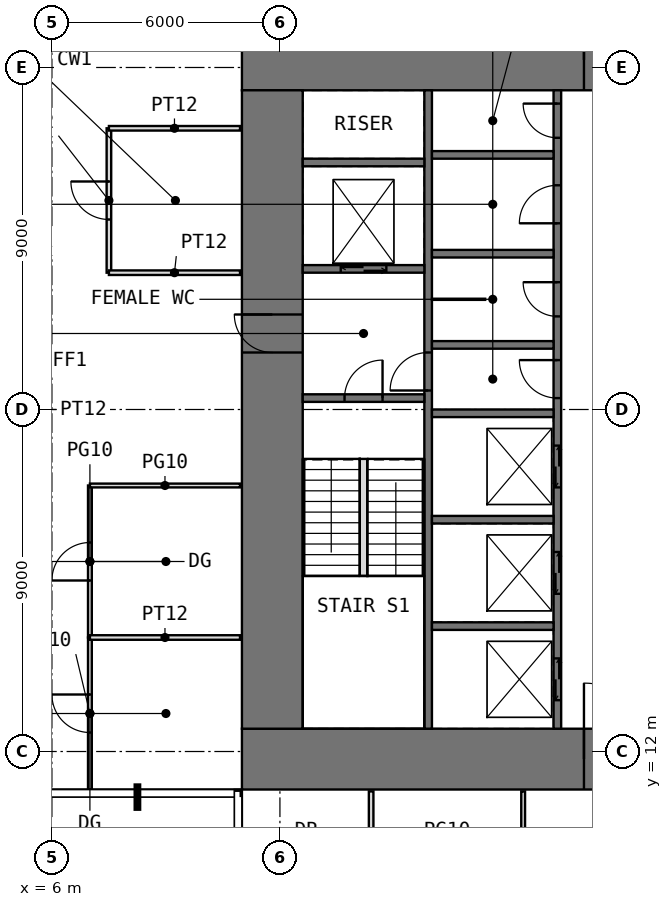
"""IFC4 building model, lengths in metres.
Left out: names, types, materials, properties, quantities, classifications, styles, units other than length and angle.
Written with IfcOpenShell. Run it as: python <this file> out.ifc"""

import sys

from ifc_helpers import new_model, si_unit, direction, frame, frame_2d, origin, place, context, subcontext, project, spatial, rectangle, extrude, element, fill, save


model = new_model("IFC4")
c1 = context("Model", 3, precision=1e-05, world=origin(), true_north=direction((0.0, 1.0)))
c2 = subcontext(c1, "Body", "Model", "MODEL_VIEW")
j1 = project(units=[si_unit("LENGTHUNIT", "METRE"), si_unit("PLANEANGLEUNIT", "RADIAN")], contexts=[c1])
p1 = place(None, origin())
s1 = spatial("IfcSite", under=j1, at=p1, CompositionType="ELEMENT")
p2 = place(p1, origin())
s2 = spatial("IfcBuilding", under=s1, at=p2, CompositionType="ELEMENT")
p3 = place(p2, frame((0.0, 0.0, 108.5)))
s3 = spatial("IfcBuildingStorey", under=s2, at=p3, CompositionType="ELEMENT", Elevation=108.5)
p4 = place(p3, frame((11.0, 11.8, -0.05), z_axis=(0.0, 0.0, 1.0), x_axis=(1.0, 0.0, 0.0)))
e1 = element("IfcWall", 1, at=p4, inside=s3, PredefinedType="SHEAR", context=c2, shape_type="SweptSolid", body=[
    extrude(rectangle(XDim=20.0, YDim=1.6, at=frame_2d((10.0, 0.0))), origin(), (0.0, 0.0, 1.0), 4.0),
])
p5 = place(p4, frame((9.0, 0.0, 0.05)))
e2 = element("IfcOpeningElement", 2, at=p5, cuts=e1, PredefinedType="OPENING", context=c2, shape_type="SweptSolid", body=[
    extrude(rectangle(XDim=2.0, YDim=2.2, at=frame_2d((1.0, 1.1))), frame((0.0, 0.81, 0.0), z_axis=(0.0, -1.0, 0.0), x_axis=(1.0, 0.0, 0.0)), (0.0, 0.0, 1.0), 1.62),
])
p6 = place(p3, frame((11.0, 30.2, -0.05), z_axis=(0.0, 0.0, 1.0), x_axis=(1.0, 0.0, 0.0)))
e3 = element("IfcWall", 3, at=p6, inside=s3, PredefinedType="SHEAR", context=c2, shape_type="SweptSolid", body=[
    extrude(rectangle(XDim=20.0, YDim=1.6, at=frame_2d((10.0, 0.0))), origin(), (0.0, 0.0, 1.0), 4.0),
])
p7 = place(p6, frame((9.0, 0.0, 0.05)))
e4 = element("IfcOpeningElement", 4, at=p7, cuts=e3, PredefinedType="OPENING", context=c2, shape_type="SweptSolid", body=[
    extrude(rectangle(XDim=2.0, YDim=2.2, at=frame_2d((1.0, 1.1))), frame((0.0, 0.81, 0.0), z_axis=(0.0, -1.0, 0.0), x_axis=(1.0, 0.0, 0.0)), (0.0, 0.0, 1.0), 1.62),
])
p8 = place(p3, frame((11.8, 12.6, -0.05), z_axis=(0.0, 0.0, 1.0), x_axis=(0.0, 1.0, 0.0)))
e5 = element("IfcWall", 5, at=p8, inside=s3, PredefinedType="SHEAR", context=c2, shape_type="SweptSolid", body=[
    extrude(rectangle(XDim=16.8, YDim=1.6, at=frame_2d((8.4, 0.0))), origin(), (0.0, 0.0, 1.0), 4.0),
])
p9 = place(p8, frame((9.9, 0.0, 0.05)))
e6 = element("IfcOpeningElement", 6, at=p9, cuts=e5, PredefinedType="OPENING", context=c2, shape_type="SweptSolid", body=[
    extrude(rectangle(XDim=1.0, YDim=2.2, at=frame_2d((0.5, 1.1))), frame((0.0, 0.81, 0.0), z_axis=(0.0, -1.0, 0.0), x_axis=(1.0, 0.0, 0.0)), (0.0, 0.0, 1.0), 1.62),
])
p10 = place(p3, frame((15.9, 12.6, -0.05), z_axis=(0.0, 0.0, 1.0), x_axis=(0.0, 1.0, 0.0)))
e7 = element("IfcWall", 7, at=p10, inside=s3, PredefinedType="SHEAR", context=c2, shape_type="SweptSolid", body=[
    extrude(rectangle(XDim=16.8, YDim=0.2, at=frame_2d((8.4, 0.0))), origin(), (0.0, 0.0, 1.0), 4.0),
])
p11 = place(p10, frame((8.9, 0.0, 0.05)))
e8 = element("IfcOpeningElement", 8, at=p11, cuts=e7, PredefinedType="OPENING", context=c2, shape_type="SweptSolid", body=[
    extrude(rectangle(XDim=1.0, YDim=2.2, at=frame_2d((0.5, 1.1))), frame((0.0, 0.11, 0.0), z_axis=(0.0, -1.0, 0.0), x_axis=(1.0, 0.0, 0.0)), (0.0, 0.0, 1.0), 0.22),
])
p12 = place(p3, frame((19.3, 12.6, -0.05), z_axis=(0.0, 0.0, 1.0), x_axis=(0.0, 1.0, 0.0)))
e9 = element("IfcWall", 9, at=p12, inside=s3, PredefinedType="SHEAR", context=c2, shape_type="SweptSolid", body=[
    extrude(rectangle(XDim=16.8, YDim=0.2, at=frame_2d((8.4, 0.0))), origin(), (0.0, 0.0, 1.0), 4.0),
])
p13 = place(p12, frame((8.7, 0.0, 0.05)))
e10 = element("IfcOpeningElement", 10, at=p13, cuts=e9, PredefinedType="OPENING", context=c2, shape_type="SweptSolid", body=[
    extrude(rectangle(XDim=1.0, YDim=2.2, at=frame_2d((0.5, 1.1))), frame((0.0, 0.11, 0.0), z_axis=(0.0, -1.0, 0.0), x_axis=(1.0, 0.0, 0.0)), (0.0, 0.0, 1.0), 0.22),
])
p14 = place(p12, frame((10.85, 0.0, 0.05)))
e11 = element("IfcOpeningElement", 11, at=p14, cuts=e9, PredefinedType="OPENING", context=c2, shape_type="SweptSolid", body=[
    extrude(rectangle(XDim=0.9, YDim=2.2, at=frame_2d((0.45, 1.1))), frame((0.0, 0.11, 0.0), z_axis=(0.0, -1.0, 0.0), x_axis=(1.0, 0.0, 0.0)), (0.0, 0.0, 1.0), 0.22),
])
p15 = place(p12, frame((13.3, 0.0, 0.05)))
e12 = element("IfcOpeningElement", 12, at=p15, cuts=e9, PredefinedType="OPENING", context=c2, shape_type="SweptSolid", body=[
    extrude(rectangle(XDim=1.0, YDim=2.2, at=frame_2d((0.5, 1.1))), frame((0.0, 0.11, 0.0), z_axis=(0.0, -1.0, 0.0), x_axis=(1.0, 0.0, 0.0)), (0.0, 0.0, 1.0), 0.22),
])
p16 = place(p12, frame((15.55, 0.0, 0.05)))
e13 = element("IfcOpeningElement", 13, at=p16, cuts=e9, PredefinedType="OPENING", context=c2, shape_type="SweptSolid", body=[
    extrude(rectangle(XDim=0.9, YDim=2.2, at=frame_2d((0.45, 1.1))), frame((0.0, 0.11, 0.0), z_axis=(0.0, -1.0, 0.0), x_axis=(1.0, 0.0, 0.0)), (0.0, 0.0, 1.0), 0.22),
])
p17 = place(p12, frame((0.75, 0.0, 0.05)))
e14 = element("IfcOpeningElement", 14, at=p17, cuts=e9, PredefinedType="OPENING", context=c2, shape_type="SweptSolid", body=[
    extrude(rectangle(XDim=1.1, YDim=2.2, at=frame_2d((0.55, 1.1))), frame((0.0, 0.11, 0.0), z_axis=(0.0, -1.0, 0.0), x_axis=(1.0, 0.0, 0.0)), (0.0, 0.0, 1.0), 0.22),
])
p18 = place(p12, frame((3.55, 0.0, 0.05)))
e15 = element("IfcOpeningElement", 15, at=p18, cuts=e9, PredefinedType="OPENING", context=c2, shape_type="SweptSolid", body=[
    extrude(rectangle(XDim=1.1, YDim=2.2, at=frame_2d((0.55, 1.1))), frame((0.0, 0.11, 0.0), z_axis=(0.0, -1.0, 0.0), x_axis=(1.0, 0.0, 0.0)), (0.0, 0.0, 1.0), 0.22),
])
p19 = place(p12, frame((6.35, 0.0, 0.05)))
e16 = element("IfcOpeningElement", 16, at=p19, cuts=e9, PredefinedType="OPENING", context=c2, shape_type="SweptSolid", body=[
    extrude(rectangle(XDim=1.1, YDim=2.2, at=frame_2d((0.55, 1.1))), frame((0.0, 0.11, 0.0), z_axis=(0.0, -1.0, 0.0), x_axis=(1.0, 0.0, 0.0)), (0.0, 0.0, 1.0), 0.22),
])
p20 = place(p3, frame((12.6, 21.3, -0.05), z_axis=(0.0, 0.0, 1.0), x_axis=(1.0, 0.0, 0.0)))
e17 = element("IfcWall", 17, at=p20, inside=s3, PredefinedType="SHEAR", context=c2, shape_type="SweptSolid", body=[
    extrude(rectangle(XDim=3.2, YDim=0.2, at=frame_2d((1.6, 0.0))), origin(), (0.0, 0.0, 1.0), 4.0),
])
p21 = place(p20, frame((1.1, 0.0, 0.05)))
e18 = element("IfcOpeningElement", 18, at=p21, cuts=e17, PredefinedType="OPENING", context=c2, shape_type="SweptSolid", body=[
    extrude(rectangle(XDim=1.0, YDim=2.2, at=frame_2d((0.5, 1.1))), frame((0.0, 0.11, 0.0), z_axis=(0.0, -1.0, 0.0), x_axis=(1.0, 0.0, 0.0)), (0.0, 0.0, 1.0), 0.22),
])
p22 = place(p3, frame((12.6, 24.7, -0.05), z_axis=(0.0, 0.0, 1.0), x_axis=(1.0, 0.0, 0.0)))
e19 = element("IfcWall", 19, at=p22, inside=s3, PredefinedType="SHEAR", context=c2, shape_type="SweptSolid", body=[
    extrude(rectangle(XDim=3.2, YDim=0.2, at=frame_2d((1.6, 0.0))), origin(), (0.0, 0.0, 1.0), 4.0),
])
p23 = place(p22, frame((1.0, 0.0, 0.05)))
e20 = element("IfcOpeningElement", 20, at=p23, cuts=e19, PredefinedType="OPENING", context=c2, shape_type="SweptSolid", body=[
    extrude(rectangle(XDim=1.2, YDim=2.2, at=frame_2d((0.6, 1.1))), frame((0.0, 0.11, 0.0), z_axis=(0.0, -1.0, 0.0), x_axis=(1.0, 0.0, 0.0)), (0.0, 0.0, 1.0), 0.22),
])
for number, where, z_axis, x_axis in (
    (21, (12.6, 27.5, -0.05), (0.0, 0.0, 1.0), (1.0, 0.0, 0.0)),
    (22, (16.0, 15.3, -0.05), (0.0, 0.0, 1.0), (1.0, 0.0, 0.0)),
    (23, (16.0, 18.1, -0.05), (0.0, 0.0, 1.0), (1.0, 0.0, 0.0)),
    (24, (16.0, 20.9, -0.05), (0.0, 0.0, 1.0), (1.0, 0.0, 0.0)),
    (25, (16.0, 22.7, -0.05), (0.0, 0.0, 1.0), (1.0, 0.0, 0.0)),
    (26, (16.0, 25.1, -0.05), (0.0, 0.0, 1.0), (1.0, 0.0, 0.0)),
    (27, (16.0, 27.7, -0.05), (0.0, 0.0, 1.0), (1.0, 0.0, 0.0)),
):
    element("IfcWall", number, at=place(p3, frame(where, z_axis=z_axis, x_axis=x_axis)), inside=s3, PredefinedType="SHEAR", context=c2, shape_type="SweptSolid", body=[
        extrude(rectangle(XDim=3.2, YDim=0.2, at=frame_2d((1.6, 0.0))), origin(), (0.0, 0.0, 1.0), 4.0),
    ])
p24 = place(p3, frame((16.0, 23.9, 0.0), z_axis=(0.0, 0.0, 1.0), x_axis=(1.0, 0.0, 0.0)))
e28 = element("IfcWall", 28, at=p24, inside=s3, PredefinedType="PARTITIONING", context=c2, shape_type="SweptSolid", body=[
    extrude(rectangle(XDim=1.4, YDim=0.03, at=frame_2d((0.7, 0.0))), origin(), (0.0, 0.0, 1.0), 3.75),
])
p25 = place(p3, frame((7.0, 11.0, 0.0), z_axis=(0.0, 0.0, 1.0), x_axis=(0.0, 1.0, 0.0)))
e29 = element("IfcWall", 29, at=p25, inside=s3, PredefinedType="PARTITIONING", context=c2, shape_type="SweptSolid", body=[
    extrude(rectangle(XDim=4.0, YDim=0.1, at=frame_2d((2.0, 0.0))), origin(), (0.0, 0.0, 1.0), 3.75),
])
p26 = place(p25, frame((1.5, 0.0, 0.0)))
e30 = element("IfcOpeningElement", 30, at=p26, cuts=e29, PredefinedType="OPENING", context=c2, shape_type="SweptSolid", body=[
    extrude(rectangle(XDim=1.0, YDim=2.4, at=frame_2d((0.5, 1.2))), frame((0.0, 0.06, 0.0), z_axis=(0.0, -1.0, 0.0), x_axis=(1.0, 0.0, 0.0)), (0.0, 0.0, 1.0), 0.12),
])
p27 = place(p3, frame((7.0, 15.0, 0.0), z_axis=(0.0, 0.0, 1.0), x_axis=(0.0, 1.0, 0.0)))
e31 = element("IfcWall", 31, at=p27, inside=s3, PredefinedType="PARTITIONING", context=c2, shape_type="SweptSolid", body=[
    extrude(rectangle(XDim=4.0, YDim=0.1, at=frame_2d((2.0, 0.0))), origin(), (0.0, 0.0, 1.0), 3.75),
])
p28 = place(p27, frame((1.5, 0.0, 0.0)))
e32 = element("IfcOpeningElement", 32, at=p28, cuts=e31, PredefinedType="OPENING", context=c2, shape_type="SweptSolid", body=[
    extrude(rectangle(XDim=1.0, YDim=2.4, at=frame_2d((0.5, 1.2))), frame((0.0, 0.06, 0.0), z_axis=(0.0, -1.0, 0.0), x_axis=(1.0, 0.0, 0.0)), (0.0, 0.0, 1.0), 0.12),
])
p29 = place(p3, frame((7.0, 15.0, 0.0), z_axis=(0.0, 0.0, 1.0), x_axis=(1.0, 0.0, 0.0)))
e33 = element("IfcWall", 33, at=p29, inside=s3, PredefinedType="PARTITIONING", context=c2, shape_type="SweptSolid", body=[
    extrude(rectangle(XDim=3.95, YDim=0.12, at=frame_2d((1.975, 0.0))), origin(), (0.0, 0.0, 1.0), 3.75),
])
p30 = place(p3, frame((7.0, 19.0, 0.0), z_axis=(0.0, 0.0, 1.0), x_axis=(1.0, 0.0, 0.0)))
e34 = element("IfcWall", 34, at=p30, inside=s3, PredefinedType="PARTITIONING", context=c2, shape_type="SweptSolid", body=[
    extrude(rectangle(XDim=3.95, YDim=0.1, at=frame_2d((1.975, 0.0))), origin(), (0.0, 0.0, 1.0), 3.75),
])
p31 = place(p3, frame((7.5, 24.6, 0.0), z_axis=(0.0, 0.0, 1.0), x_axis=(0.0, 1.0, 0.0)))
e35 = element("IfcWall", 35, at=p31, inside=s3, PredefinedType="PARTITIONING", context=c2, shape_type="SweptSolid", body=[
    extrude(rectangle(XDim=3.8, YDim=0.12, at=frame_2d((1.9, 0.0))), origin(), (0.0, 0.0, 1.0), 3.75),
])
p32 = place(p31, frame((1.4, 0.0, 0.0)))
e36 = element("IfcOpeningElement", 36, at=p32, cuts=e35, PredefinedType="OPENING", context=c2, shape_type="SweptSolid", body=[
    extrude(rectangle(XDim=1.0, YDim=2.2, at=frame_2d((0.5, 1.1))), frame((0.0, 0.07, 0.0), z_axis=(0.0, -1.0, 0.0), x_axis=(1.0, 0.0, 0.0)), (0.0, 0.0, 1.0), 0.14),
])
for number, where, z_axis, x_axis in (
    (37, (7.5, 24.6, 0.0), (0.0, 0.0, 1.0), (1.0, 0.0, 0.0)),
    (38, (7.5, 28.4, 0.0), (0.0, 0.0, 1.0), (1.0, 0.0, 0.0)),
):
    element("IfcWall", number, at=place(p3, frame(where, z_axis=z_axis, x_axis=x_axis)), inside=s3, PredefinedType="PARTITIONING", context=c2, shape_type="SweptSolid", body=[
        extrude(rectangle(XDim=3.45, YDim=0.12, at=frame_2d((1.725, 0.0))), origin(), (0.0, 0.0, 1.0), 3.75),
    ])
p33 = place(p3, frame((14.4, 7.0, 0.0), z_axis=(0.0, 0.0, 1.0), x_axis=(0.0, 1.0, 0.0)))
e39 = element("IfcWall", 39, at=p33, inside=s3, PredefinedType="PARTITIONING", context=c2, shape_type="SweptSolid", body=[
    extrude(rectangle(XDim=3.95, YDim=0.12, at=frame_2d((1.975, 0.0))), origin(), (0.0, 0.0, 1.0), 3.75),
])
p34 = place(p3, frame((18.4, 7.0, 0.0), z_axis=(0.0, 0.0, 1.0), x_axis=(0.0, 1.0, 0.0)))
e40 = element("IfcWall", 40, at=p34, inside=s3, PredefinedType="PARTITIONING", context=c2, shape_type="SweptSolid", body=[
    extrude(rectangle(XDim=3.95, YDim=0.1, at=frame_2d((1.975, 0.0))), origin(), (0.0, 0.0, 1.0), 3.75),
])
p35 = place(p3, frame((14.2, 16.62, 0.0), z_axis=(0.0, 0.0, 1.0), x_axis=(0.0, 1.0, 0.0)))
e41 = element("IfcWall", 41, at=p35, inside=s3, PredefinedType="PARTITIONING", context=c2, shape_type="SweptSolid", body=[
    extrude(rectangle(XDim=3.08, YDim=0.2, at=frame_2d((1.54, 0.0))), origin(), (0.0, 0.0, 1.0), 4.0),
])
p36 = place(p5, origin())
e42 = element("IfcDoor", 42, at=p36, inside=s3, OperationType="DOUBLE_DOOR_SINGLE_SWING", PredefinedType="DOOR", context=c2, shape_type="SweptSolid", body=[
    extrude(rectangle(XDim=2.0, YDim=2.2, at=frame_2d((1.0, 1.1))), frame((0.0, 0.025, 0.0), z_axis=(0.0, -1.0, 0.0), x_axis=(1.0, 0.0, 0.0)), (0.0, 0.0, 1.0), 0.05),
])
fill(e2, e42)
p37 = place(p7, origin())
e43 = element("IfcDoor", 43, at=p37, inside=s3, OperationType="DOUBLE_DOOR_SINGLE_SWING", PredefinedType="DOOR", context=c2, shape_type="SweptSolid", body=[
    extrude(rectangle(XDim=2.0, YDim=2.2, at=frame_2d((1.0, 1.1))), frame((0.0, 0.025, 0.0), z_axis=(0.0, -1.0, 0.0), x_axis=(1.0, 0.0, 0.0)), (0.0, 0.0, 1.0), 0.05),
])
fill(e4, e43)
p38 = place(p9, origin())
e44 = element("IfcDoor", 44, at=p38, inside=s3, OperationType="SINGLE_SWING_RIGHT", PredefinedType="DOOR", context=c2, shape_type="SweptSolid", body=[
    extrude(rectangle(XDim=1.0, YDim=2.2, at=frame_2d((0.5, 1.1))), frame((0.0, 0.025, 0.0), z_axis=(0.0, -1.0, 0.0), x_axis=(1.0, 0.0, 0.0)), (0.0, 0.0, 1.0), 0.05),
])
fill(e6, e44)
p39 = place(p21, origin())
e45 = element("IfcDoor", 45, at=p39, inside=s3, OperationType="SINGLE_SWING_RIGHT", PredefinedType="DOOR", context=c2, shape_type="SweptSolid", body=[
    extrude(rectangle(XDim=1.0, YDim=2.2, at=frame_2d((0.5, 1.1))), frame((0.0, 0.025, 0.0), z_axis=(0.0, -1.0, 0.0), x_axis=(1.0, 0.0, 0.0)), (0.0, 0.0, 1.0), 0.05),
])
fill(e18, e45)
p40 = place(p11, origin())
e46 = element("IfcDoor", 46, at=p40, inside=s3, OperationType="SINGLE_SWING_LEFT", PredefinedType="DOOR", context=c2, shape_type="SweptSolid", body=[
    extrude(rectangle(XDim=1.0, YDim=2.2, at=frame_2d((0.5, 1.1))), frame((0.0, 0.025, 0.0), z_axis=(0.0, -1.0, 0.0), x_axis=(1.0, 0.0, 0.0)), (0.0, 0.0, 1.0), 0.05),
])
fill(e8, e46)
p41 = place(p13, origin())
e47 = element("IfcDoor", 47, at=p41, inside=s3, OperationType="SINGLE_SWING_RIGHT", PredefinedType="DOOR", context=c2, shape_type="SweptSolid", body=[
    extrude(rectangle(XDim=1.0, YDim=2.2, at=frame_2d((0.5, 1.1))), frame((0.0, 0.025, 0.0), z_axis=(0.0, -1.0, 0.0), x_axis=(1.0, 0.0, 0.0)), (0.0, 0.0, 1.0), 0.05),
])
fill(e10, e47)
p42 = place(p14, origin())
e48 = element("IfcDoor", 48, at=p42, inside=s3, OperationType="SINGLE_SWING_RIGHT", PredefinedType="DOOR", context=c2, shape_type="SweptSolid", body=[
    extrude(rectangle(XDim=0.9, YDim=2.2, at=frame_2d((0.45, 1.1))), frame((0.0, 0.025, 0.0), z_axis=(0.0, -1.0, 0.0), x_axis=(1.0, 0.0, 0.0)), (0.0, 0.0, 1.0), 0.05),
])
fill(e11, e48)
p43 = place(p15, origin())
e49 = element("IfcDoor", 49, at=p43, inside=s3, OperationType="SINGLE_SWING_LEFT", PredefinedType="DOOR", context=c2, shape_type="SweptSolid", body=[
    extrude(rectangle(XDim=1.0, YDim=2.2, at=frame_2d((0.5, 1.1))), frame((0.0, 0.025, 0.0), z_axis=(0.0, -1.0, 0.0), x_axis=(1.0, 0.0, 0.0)), (0.0, 0.0, 1.0), 0.05),
])
fill(e12, e49)
p44 = place(p16, origin())
e50 = element("IfcDoor", 50, at=p44, inside=s3, OperationType="SINGLE_SWING_RIGHT", PredefinedType="DOOR", context=c2, shape_type="SweptSolid", body=[
    extrude(rectangle(XDim=0.9, YDim=2.2, at=frame_2d((0.45, 1.1))), frame((0.0, 0.025, 0.0), z_axis=(0.0, -1.0, 0.0), x_axis=(1.0, 0.0, 0.0)), (0.0, 0.0, 1.0), 0.05),
])
fill(e13, e50)
p45 = place(p26, origin())
e51 = element("IfcDoor", 51, at=p45, inside=s3, OperationType="SINGLE_SWING_RIGHT", PredefinedType="DOOR", context=c2, shape_type="SweptSolid", body=[
    extrude(rectangle(XDim=1.0, YDim=2.4, at=frame_2d((0.5, 1.2))), frame((0.0, 0.025, 0.0), z_axis=(0.0, -1.0, 0.0), x_axis=(1.0, 0.0, 0.0)), (0.0, 0.0, 1.0), 0.05),
])
fill(e30, e51)
p46 = place(p28, origin())
e52 = element("IfcDoor", 52, at=p46, inside=s3, OperationType="SINGLE_SWING_LEFT", PredefinedType="DOOR", context=c2, shape_type="SweptSolid", body=[
    extrude(rectangle(XDim=1.0, YDim=2.4, at=frame_2d((0.5, 1.2))), frame((0.0, 0.025, 0.0), z_axis=(0.0, -1.0, 0.0), x_axis=(1.0, 0.0, 0.0)), (0.0, 0.0, 1.0), 0.05),
])
fill(e32, e52)
p47 = place(p32, origin())
e53 = element("IfcDoor", 53, at=p47, inside=s3, OperationType="SINGLE_SWING_RIGHT", PredefinedType="DOOR", context=c2, shape_type="SweptSolid", body=[
    extrude(rectangle(XDim=1.0, YDim=2.2, at=frame_2d((0.5, 1.1))), frame((0.0, 0.025, 0.0), z_axis=(0.0, -1.0, 0.0), x_axis=(1.0, 0.0, 0.0)), (0.0, 0.0, 1.0), 0.05),
])
fill(e36, e53)
p48 = place(p17, origin())
e54 = element("IfcDoor", 54, at=p48, inside=s3, OperationType="DOUBLE_DOOR_SLIDING", PredefinedType="DOOR", context=c2, shape_type="SweptSolid", body=[
    extrude(rectangle(XDim=1.1, YDim=2.2, at=frame_2d((0.55, 1.1))), frame((0.0, 0.025, 0.0), z_axis=(0.0, -1.0, 0.0), x_axis=(1.0, 0.0, 0.0)), (0.0, 0.0, 1.0), 0.05),
])
fill(e14, e54)
p49 = place(p18, origin())
e55 = element("IfcDoor", 55, at=p49, inside=s3, OperationType="DOUBLE_DOOR_SLIDING", PredefinedType="DOOR", context=c2, shape_type="SweptSolid", body=[
    extrude(rectangle(XDim=1.1, YDim=2.2, at=frame_2d((0.55, 1.1))), frame((0.0, 0.025, 0.0), z_axis=(0.0, -1.0, 0.0), x_axis=(1.0, 0.0, 0.0)), (0.0, 0.0, 1.0), 0.05),
])
fill(e15, e55)
p50 = place(p19, origin())
e56 = element("IfcDoor", 56, at=p50, inside=s3, OperationType="DOUBLE_DOOR_SLIDING", PredefinedType="DOOR", context=c2, shape_type="SweptSolid", body=[
    extrude(rectangle(XDim=1.1, YDim=2.2, at=frame_2d((0.55, 1.1))), frame((0.0, 0.025, 0.0), z_axis=(0.0, -1.0, 0.0), x_axis=(1.0, 0.0, 0.0)), (0.0, 0.0, 1.0), 0.05),
])
fill(e16, e56)
p51 = place(p23, origin())
e57 = element("IfcDoor", 57, at=p51, inside=s3, OperationType="DOUBLE_DOOR_SLIDING", PredefinedType="DOOR", context=c2, shape_type="SweptSolid", body=[
    extrude(rectangle(XDim=1.2, YDim=2.2, at=frame_2d((0.6, 1.1))), frame((0.0, 0.025, 0.0), z_axis=(0.0, -1.0, 0.0), x_axis=(1.0, 0.0, 0.0)), (0.0, 0.0, 1.0), 0.05),
])
fill(e20, e57)
save(model, sys.argv[1])
